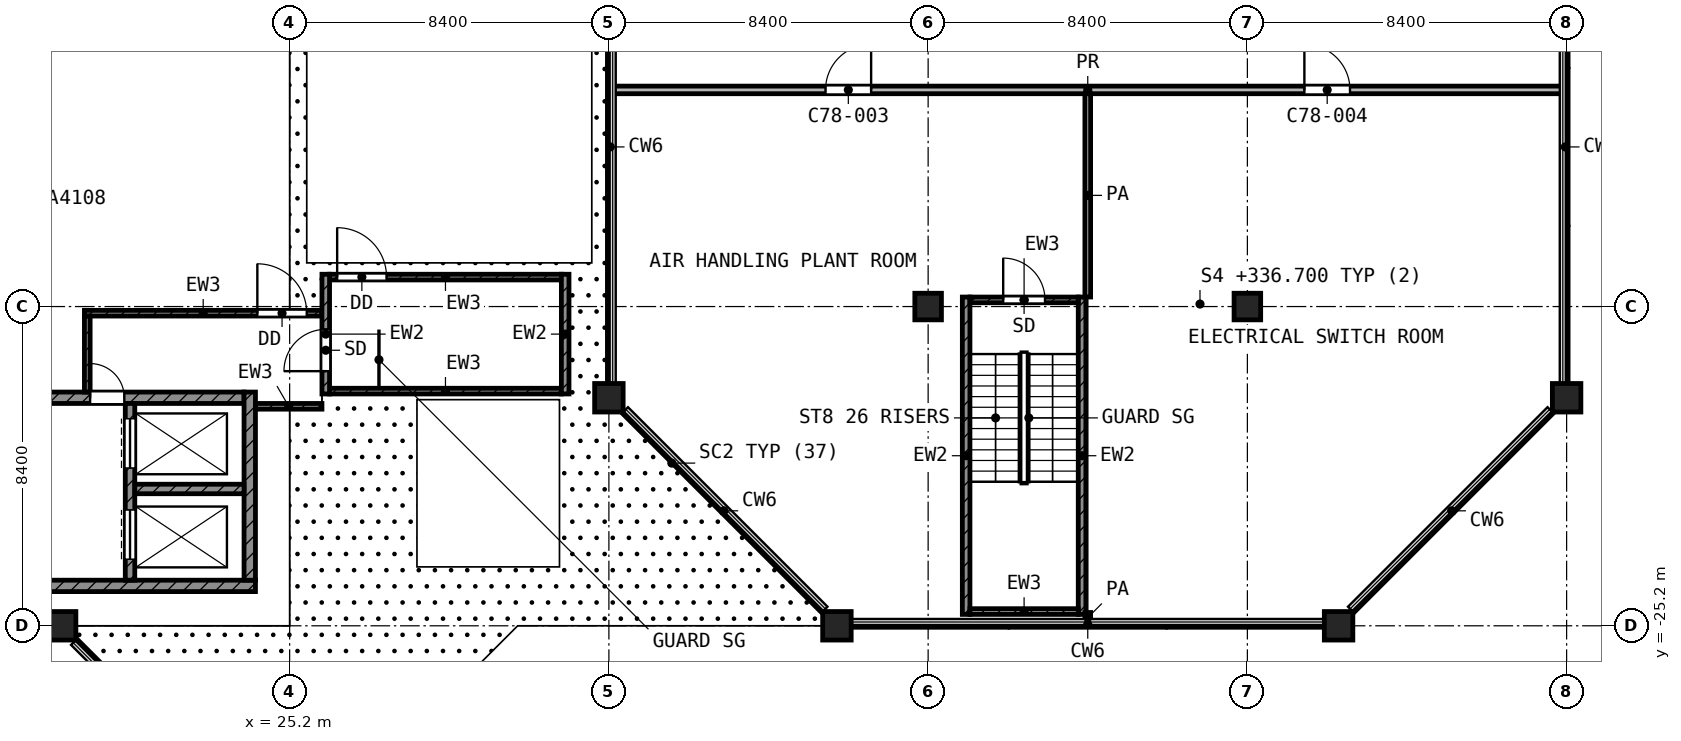
"""IFC4 building model, lengths in metres.
Left out: names, types, materials, properties, quantities, classifications, styles, units other than length and angle.
Written with IfcOpenShell. Run it as: python <this file> out.ifc"""

import sys

from ifc_helpers import new_model, si_unit, direction, frame, frame_2d, origin, origin_2d, place, context, subcontext, project, spatial, rectangle, extrude, element, fill, save


model = new_model("IFC4")
c1 = context("Model", 3, precision=1e-05, world=origin(), true_north=direction((0.0, 1.0)))
c2 = subcontext(c1, "Body", "Model", "MODEL_VIEW")
j1 = project(units=[si_unit("LENGTHUNIT", "METRE"), si_unit("PLANEANGLEUNIT", "RADIAN")], contexts=[c1])
p1 = place(None, origin())
s1 = spatial("IfcSite", under=j1, at=p1, CompositionType="ELEMENT")
p2 = place(p1, origin())
s2 = spatial("IfcBuilding", under=s1, at=p2, CompositionType="ELEMENT")
p3 = place(p2, frame((0.0, 0.0, 336.7)))
s3 = spatial("IfcBuildingStorey", under=s2, at=p3, CompositionType="ELEMENT", Elevation=336.7)
for number, where, z_axis, x_axis in (
    (1, (42.0, -16.8, 0.0), (0.0, 0.0, 1.0), (1.0, 0.0, 0.0)),
    (2, (50.4, -16.8, 0.0), (0.0, 0.0, 1.0), (1.0, 0.0, 0.0)),
):
    element("IfcColumn", number, at=place(p3, frame(where, z_axis=z_axis, x_axis=x_axis)), inside=s3, PredefinedType="COLUMN", context=c2, shape_type="SweptSolid", body=[
        extrude(rectangle(XDim=0.7, YDim=0.7, at=origin_2d()), origin(), (0.0, 0.0, 1.0), 4.5),
    ])
for number, where, z_axis, x_axis in (
    (3, (33.6, -19.2, 0.0), (0.0, 0.0, 1.0), (1.0, 0.0, 0.0)),
    (4, (58.8, -19.2, 0.0), (0.0, 0.0, 1.0), (1.0, 0.0, 0.0)),
    (5, (19.2, -25.2, 0.0), (0.0, 0.0, 1.0), (1.0, 0.0, 0.0)),
    (6, (39.6, -25.2, 0.0), (0.0, 0.0, 1.0), (1.0, 0.0, 0.0)),
    (7, (52.8, -25.2, 0.0), (0.0, 0.0, 1.0), (1.0, 0.0, 0.0)),
):
    element("IfcColumn", number, at=place(p3, frame(where, z_axis=z_axis, x_axis=x_axis)), inside=s3, PredefinedType="COLUMN", context=c2, shape_type="SweptSolid", body=[
        extrude(rectangle(XDim=0.75, YDim=0.75, at=origin_2d()), origin(), (0.0, 0.0, 1.0), 4.5),
    ])
p4 = place(p2, frame((0.0, 0.0, 332.2)))
s4 = spatial("IfcBuildingStorey", under=s2, at=p4, CompositionType="ELEMENT", Elevation=332.2)
p5 = place(p4, frame((32.175, -19.25, 4.5), z_axis=(0.0, 0.0, 1.0), x_axis=(0.0, -1.0, 0.0)))
e8 = element("IfcWall", 8, at=p5, inside=s4, PredefinedType="SOLIDWALL", context=c2, shape_type="SweptSolid", body=[
    extrude(rectangle(XDim=4.4, YDim=0.25, at=frame_2d((2.2, 0.0))), origin(), (0.0, 0.0, 1.0), 1.717),
])
for number, where, z_axis, x_axis in (
    (9, (43.0, -24.9, 0.0), (0.0, 0.0, 1.0), (0.0, 1.0, 0.0)),
    (10, (46.05, -24.9, 0.0), (0.0, 0.0, 1.0), (0.0, 1.0, 0.0)),
):
    element("IfcWall", number, at=place(p3, frame(where, z_axis=z_axis, x_axis=x_axis)), inside=s3, PredefinedType="SHEAR", context=c2, shape_type="SweptSolid", body=[
        extrude(rectangle(XDim=8.35, YDim=0.2, at=frame_2d((4.175, 0.0))), origin(), (0.0, 0.0, 1.0), 4.2),
    ])
p6 = place(p3, frame((43.1, -16.625, 0.0), z_axis=(0.0, 0.0, 1.0), x_axis=(1.0, 0.0, 0.0)))
e11 = element("IfcWall", 11, at=p6, inside=s3, PredefinedType="SHEAR", context=c2, shape_type="SweptSolid", body=[
    extrude(rectangle(XDim=2.85, YDim=0.15, at=frame_2d((1.425, 0.0))), origin(), (0.0, 0.0, 1.0), 4.2),
])
p7 = place(p6, frame((0.875, 0.0, 0.0)))
e12 = element("IfcOpeningElement", 12, at=p7, cuts=e11, PredefinedType="OPENING", context=c2, shape_type="SweptSolid", body=[
    extrude(rectangle(XDim=1.1, YDim=2.1, at=frame_2d((0.55, 1.05))), frame((0.0, 0.085, 0.0), z_axis=(0.0, -1.0, 0.0), x_axis=(1.0, 0.0, 0.0)), (0.0, 0.0, 1.0), 0.17),
])
p8 = place(p3, frame((43.1, -24.825, 0.0), z_axis=(0.0, 0.0, 1.0), x_axis=(1.0, 0.0, 0.0)))
e13 = element("IfcWall", 13, at=p8, inside=s3, PredefinedType="SHEAR", context=c2, shape_type="SweptSolid", body=[
    extrude(rectangle(XDim=2.85, YDim=0.15, at=frame_2d((1.425, 0.0))), origin(), (0.0, 0.0, 1.0), 4.2),
])
p9 = place(p3, frame((26.15, -19.1, 0.0), z_axis=(0.0, 0.0, 1.0), x_axis=(0.0, 1.0, 0.0)))
e14 = element("IfcWall", 14, at=p9, inside=s3, PredefinedType="SHEAR", context=c2, shape_type="SweptSolid", body=[
    extrude(rectangle(XDim=3.15, YDim=0.2, at=frame_2d((1.575, 0.0))), origin(), (0.0, 0.0, 1.0), 4.2),
])
p10 = place(p9, frame((0.6, 0.0, 0.0)))
e15 = element("IfcOpeningElement", 15, at=p10, cuts=e14, PredefinedType="OPENING", context=c2, shape_type="SweptSolid", body=[
    extrude(rectangle(XDim=1.1, YDim=2.1, at=frame_2d((0.55, 1.05))), frame((0.0, 0.11, 0.0), z_axis=(0.0, -1.0, 0.0), x_axis=(1.0, 0.0, 0.0)), (0.0, 0.0, 1.0), 0.22),
])
p11 = place(p3, frame((32.45, -19.1, 0.0), z_axis=(0.0, 0.0, 1.0), x_axis=(0.0, 1.0, 0.0)))
e16 = element("IfcWall", 16, at=p11, inside=s3, PredefinedType="SHEAR", context=c2, shape_type="SweptSolid", body=[
    extrude(rectangle(XDim=3.15, YDim=0.2, at=frame_2d((1.575, 0.0))), origin(), (0.0, 0.0, 1.0), 4.2),
])
p12 = place(p3, frame((26.25, -16.025, 0.0), z_axis=(0.0, 0.0, 1.0), x_axis=(1.0, 0.0, 0.0)))
e17 = element("IfcWall", 17, at=p12, inside=s3, PredefinedType="SHEAR", context=c2, shape_type="SweptSolid", body=[
    extrude(rectangle(XDim=6.1, YDim=0.15, at=frame_2d((3.05, 0.0))), origin(), (0.0, 0.0, 1.0), 4.2),
])
p13 = place(p12, frame((0.2, 0.0, 0.0)))
e18 = element("IfcOpeningElement", 18, at=p13, cuts=e17, PredefinedType="OPENING", context=c2, shape_type="SweptSolid", body=[
    extrude(rectangle(XDim=1.3, YDim=2.1, at=frame_2d((0.65, 1.05))), frame((0.0, 0.085, 0.0), z_axis=(0.0, -1.0, 0.0), x_axis=(1.0, 0.0, 0.0)), (0.0, 0.0, 1.0), 0.17),
])
p14 = place(p3, frame((26.25, -19.025, 0.0), z_axis=(0.0, 0.0, 1.0), x_axis=(1.0, 0.0, 0.0)))
e19 = element("IfcWall", 19, at=p14, inside=s3, PredefinedType="SHEAR", context=c2, shape_type="SweptSolid", body=[
    extrude(rectangle(XDim=6.1, YDim=0.15, at=frame_2d((3.05, 0.0))), origin(), (0.0, 0.0, 1.0), 4.2),
])
p15 = place(p3, frame((18.3, -24.15, 0.0), z_axis=(0.0, 0.0, 1.0), x_axis=(1.0, 0.0, 0.0)))
e20 = element("IfcWall", 20, at=p15, inside=s3, PredefinedType="SHEAR", context=c2, shape_type="SweptSolid", body=[
    extrude(rectangle(XDim=6.0, YDim=0.3, at=frame_2d((3.0, 0.0))), origin(), (0.0, 0.0, 1.0), 4.2),
])
p16 = place(p3, frame((24.15, -24.0, 0.0), z_axis=(0.0, 0.0, 1.0), x_axis=(0.0, 1.0, 0.0)))
e21 = element("IfcWall", 21, at=p16, inside=s3, PredefinedType="SHEAR", context=c2, shape_type="SweptSolid", body=[
    extrude(rectangle(XDim=4.95, YDim=0.3, at=frame_2d((2.475, 0.0))), origin(), (0.0, 0.0, 1.0), 4.2),
])
p17 = place(p3, frame((18.3, -19.2, 0.0), z_axis=(0.0, 0.0, 1.0), x_axis=(1.0, 0.0, 0.0)))
e22 = element("IfcWall", 22, at=p17, inside=s3, PredefinedType="SHEAR", context=c2, shape_type="SweptSolid", body=[
    extrude(rectangle(XDim=5.7, YDim=0.3, at=frame_2d((2.85, 0.0))), origin(), (0.0, 0.0, 1.0), 4.2),
])
p18 = place(p17, frame((1.65, 0.0, 0.0)))
e23 = element("IfcOpeningElement", 23, at=p18, cuts=e22, PredefinedType="OPENING", context=c2, shape_type="SweptSolid", body=[
    extrude(rectangle(XDim=0.9, YDim=2.1, at=frame_2d((0.45, 1.05))), frame((0.0, 0.16, 0.0), z_axis=(0.0, -1.0, 0.0), x_axis=(1.0, 0.0, 0.0)), (0.0, 0.0, 1.0), 0.32),
])
p19 = place(p3, frame((21.0, -24.0, 0.0), z_axis=(0.0, 0.0, 1.0), x_axis=(0.0, 1.0, 0.0)))
e24 = element("IfcWall", 24, at=p19, inside=s3, PredefinedType="SHEAR", context=c2, shape_type="SweptSolid", body=[
    extrude(rectangle(XDim=4.65, YDim=0.25, at=frame_2d((2.325, 0.0))), origin(), (0.0, 0.0, 1.0), 4.2),
])
p20 = place(p19, frame((2.95, 0.0, 0.0)))
e25 = element("IfcOpeningElement", 25, at=p20, cuts=e24, PredefinedType="OPENING", context=c2, shape_type="SweptSolid", body=[
    extrude(rectangle(XDim=1.3, YDim=2.1, at=frame_2d((0.65, 1.05))), frame((0.0, 0.135, 0.0), z_axis=(0.0, -1.0, 0.0), x_axis=(1.0, 0.0, 0.0)), (0.0, 0.0, 1.0), 0.27),
])
p21 = place(p19, frame((0.55, 0.0, 0.0)))
e26 = element("IfcOpeningElement", 26, at=p21, cuts=e24, PredefinedType="OPENING", context=c2, shape_type="SweptSolid", body=[
    extrude(rectangle(XDim=1.3, YDim=2.1, at=frame_2d((0.65, 1.05))), frame((0.0, 0.135, 0.0), z_axis=(0.0, -1.0, 0.0), x_axis=(1.0, 0.0, 0.0)), (0.0, 0.0, 1.0), 0.27),
])
p22 = place(p3, frame((21.125, -21.6, 0.0), z_axis=(0.0, 0.0, 1.0), x_axis=(1.0, 0.0, 0.0)))
e27 = element("IfcWall", 27, at=p22, inside=s3, PredefinedType="SHEAR", context=c2, shape_type="SweptSolid", body=[
    extrude(rectangle(XDim=2.875, YDim=0.25, at=frame_2d((1.438, 0.0))), origin(), (0.0, 0.0, 1.0), 4.2),
])
p23 = place(p3, frame((19.8, -16.975, 0.0), z_axis=(0.0, 0.0, 1.0), x_axis=(1.0, 0.0, 0.0)))
e28 = element("IfcWall", 28, at=p23, inside=s3, PredefinedType="SHEAR", context=c2, shape_type="SweptSolid", body=[
    extrude(rectangle(XDim=6.25, YDim=0.15, at=frame_2d((3.125, 0.0))), origin(), (0.0, 0.0, 1.0), 4.2),
])
p24 = place(p23, frame((4.55, 0.0, 0.0)))
e29 = element("IfcOpeningElement", 29, at=p24, cuts=e28, PredefinedType="OPENING", context=c2, shape_type="SweptSolid", body=[
    extrude(rectangle(XDim=1.3, YDim=2.1, at=frame_2d((0.65, 1.05))), frame((0.0, 0.085, 0.0), z_axis=(0.0, -1.0, 0.0), x_axis=(1.0, 0.0, 0.0)), (0.0, 0.0, 1.0), 0.17),
])
p25 = place(p3, frame((19.875, -19.05, 0.0), z_axis=(0.0, 0.0, 1.0), x_axis=(0.0, 1.0, 0.0)))
e30 = element("IfcWall", 30, at=p25, inside=s3, PredefinedType="SHEAR", context=c2, shape_type="SweptSolid", body=[
    extrude(rectangle(XDim=2.0, YDim=0.15, at=frame_2d((1.0, 0.0))), origin(), (0.0, 0.0, 1.0), 4.2),
])
p26 = place(p3, frame((24.3, -19.425, 0.0), z_axis=(0.0, 0.0, 1.0), x_axis=(1.0, 0.0, 0.0)))
e31 = element("IfcWall", 31, at=p26, inside=s3, PredefinedType="SHEAR", context=c2, shape_type="SweptSolid", body=[
    extrude(rectangle(XDim=1.75, YDim=0.15, at=frame_2d((0.875, 0.0))), origin(), (0.0, 0.0, 1.0), 4.2),
])
p27 = place(p3, frame((46.2, -25.12, 0.0), z_axis=(0.0, 0.0, 1.0), x_axis=(0.0, 1.0, 0.0)))
e32 = element("IfcWall", 32, at=p27, inside=s3, PredefinedType="PARTITIONING", context=c2, shape_type="SweptSolid", body=[
    extrude(rectangle(XDim=0.27, YDim=0.15, at=frame_2d((0.135, 0.0))), origin(), (0.0, 0.0, 1.0), 4.2),
])
p28 = place(p3, frame((46.2, -16.549, 0.0), z_axis=(0.0, 0.0, 1.0), x_axis=(0.0, 1.0, 0.0)))
e33 = element("IfcWall", 33, at=p28, inside=s3, PredefinedType="PARTITIONING", context=c2, shape_type="SweptSolid", body=[
    extrude(rectangle(XDim=5.349, YDim=0.15, at=frame_2d((2.675, 0.0))), origin(), (0.0, 0.0, 1.0), 4.2),
])
p29 = place(p3, frame((33.68, -11.1, 0.0), z_axis=(0.0, 0.0, 1.0), x_axis=(1.0, 0.0, 0.0)))
e34 = element("IfcWall", 34, at=p29, inside=s3, PredefinedType="PARTITIONING", context=c2, shape_type="SweptSolid", body=[
    extrude(rectangle(XDim=25.04, YDim=0.2, at=frame_2d((12.52, 0.0))), origin(), (0.0, 0.0, 1.0), 4.2),
])
p30 = place(p29, frame((5.62, 0.0, 0.0)))
e35 = element("IfcOpeningElement", 35, at=p30, cuts=e34, PredefinedType="OPENING", context=c2, shape_type="SweptSolid", body=[
    extrude(rectangle(XDim=1.2, YDim=2.1, at=frame_2d((0.6, 1.05))), frame((0.0, 0.11, 0.0), z_axis=(0.0, -1.0, 0.0), x_axis=(1.0, 0.0, 0.0)), (0.0, 0.0, 1.0), 0.22),
])
p31 = place(p29, frame((18.22, 0.0, 0.0)))
e36 = element("IfcOpeningElement", 36, at=p31, cuts=e34, PredefinedType="OPENING", context=c2, shape_type="SweptSolid", body=[
    extrude(rectangle(XDim=1.2, YDim=2.1, at=frame_2d((0.6, 1.05))), frame((0.0, 0.11, 0.0), z_axis=(0.0, -1.0, 0.0), x_axis=(1.0, 0.0, 0.0)), (0.0, 0.0, 1.0), 0.22),
])
p32 = place(p7, origin())
e37 = element("IfcDoor", 37, at=p32, inside=s3, OperationType="SINGLE_SWING_LEFT", PredefinedType="DOOR", context=c2, shape_type="SweptSolid", body=[
    extrude(rectangle(XDim=1.1, YDim=2.1, at=frame_2d((0.55, 1.05))), frame((0.0, 0.025, 0.0), z_axis=(0.0, -1.0, 0.0), x_axis=(1.0, 0.0, 0.0)), (0.0, 0.0, 1.0), 0.05),
])
fill(e12, e37)
p33 = place(p10, origin())
e38 = element("IfcDoor", 38, at=p33, inside=s3, OperationType="SINGLE_SWING_LEFT", PredefinedType="DOOR", context=c2, shape_type="SweptSolid", body=[
    extrude(rectangle(XDim=1.1, YDim=2.1, at=frame_2d((0.55, 1.05))), frame((0.0, 0.025, 0.0), z_axis=(0.0, -1.0, 0.0), x_axis=(1.0, 0.0, 0.0)), (0.0, 0.0, 1.0), 0.05),
])
fill(e15, e38)
p34 = place(p13, origin())
e39 = element("IfcDoor", 39, at=p34, inside=s3, OperationType="SINGLE_SWING_LEFT", PredefinedType="DOOR", context=c2, shape_type="SweptSolid", body=[
    extrude(rectangle(XDim=1.3, YDim=2.1, at=frame_2d((0.65, 1.05))), frame((0.0, 0.025, 0.0), z_axis=(0.0, -1.0, 0.0), x_axis=(1.0, 0.0, 0.0)), (0.0, 0.0, 1.0), 0.05),
])
fill(e18, e39)
p35 = place(p18, origin())
e40 = element("IfcDoor", 40, at=p35, inside=s3, OperationType="SINGLE_SWING_LEFT", PredefinedType="DOOR", context=c2, shape_type="SweptSolid", body=[
    extrude(rectangle(XDim=0.9, YDim=2.1, at=frame_2d((0.45, 1.05))), frame((0.0, 0.025, 0.0), z_axis=(0.0, -1.0, 0.0), x_axis=(1.0, 0.0, 0.0)), (0.0, 0.0, 1.0), 0.05),
])
fill(e23, e40)
p36 = place(p24, origin())
e41 = element("IfcDoor", 41, at=p36, inside=s3, OperationType="SINGLE_SWING_LEFT", PredefinedType="DOOR", context=c2, shape_type="SweptSolid", body=[
    extrude(rectangle(XDim=1.3, YDim=2.1, at=frame_2d((0.65, 1.05))), frame((0.0, 0.025, 0.0), z_axis=(0.0, -1.0, 0.0), x_axis=(1.0, 0.0, 0.0)), (0.0, 0.0, 1.0), 0.05),
])
fill(e29, e41)
p37 = place(p20, origin())
e42 = element("IfcDoor", 42, at=p37, inside=s3, OperationType="DOUBLE_DOOR_SLIDING", PredefinedType="DOOR", context=c2, shape_type="SweptSolid", body=[
    extrude(rectangle(XDim=1.3, YDim=2.1, at=frame_2d((0.65, 1.05))), frame((0.0, 0.025, 0.0), z_axis=(0.0, -1.0, 0.0), x_axis=(1.0, 0.0, 0.0)), (0.0, 0.0, 1.0), 0.05),
])
fill(e25, e42)
p38 = place(p21, origin())
e43 = element("IfcDoor", 43, at=p38, inside=s3, OperationType="DOUBLE_DOOR_SLIDING", PredefinedType="DOOR", context=c2, shape_type="SweptSolid", body=[
    extrude(rectangle(XDim=1.3, YDim=2.1, at=frame_2d((0.65, 1.05))), frame((0.0, 0.025, 0.0), z_axis=(0.0, -1.0, 0.0), x_axis=(1.0, 0.0, 0.0)), (0.0, 0.0, 1.0), 0.05),
])
fill(e26, e43)
p39 = place(p30, origin())
e44 = element("IfcDoor", 44, at=p39, inside=s3, OperationType="SINGLE_SWING_RIGHT", PredefinedType="DOOR", context=c2, shape_type="SweptSolid", body=[
    extrude(rectangle(XDim=1.2, YDim=2.1, at=frame_2d((0.6, 1.05))), frame((0.0, 0.025, 0.0), z_axis=(0.0, -1.0, 0.0), x_axis=(1.0, 0.0, 0.0)), (0.0, 0.0, 1.0), 0.05),
])
fill(e35, e44)
p40 = place(p31, origin())
e45 = element("IfcDoor", 45, at=p40, inside=s3, OperationType="SINGLE_SWING_LEFT", PredefinedType="DOOR", context=c2, shape_type="SweptSolid", body=[
    extrude(rectangle(XDim=1.2, YDim=2.1, at=frame_2d((0.6, 1.05))), frame((0.0, 0.025, 0.0), z_axis=(0.0, -1.0, 0.0), x_axis=(1.0, 0.0, 0.0)), (0.0, 0.0, 1.0), 0.05),
])
fill(e36, e45)
save(model, sys.argv[1])
